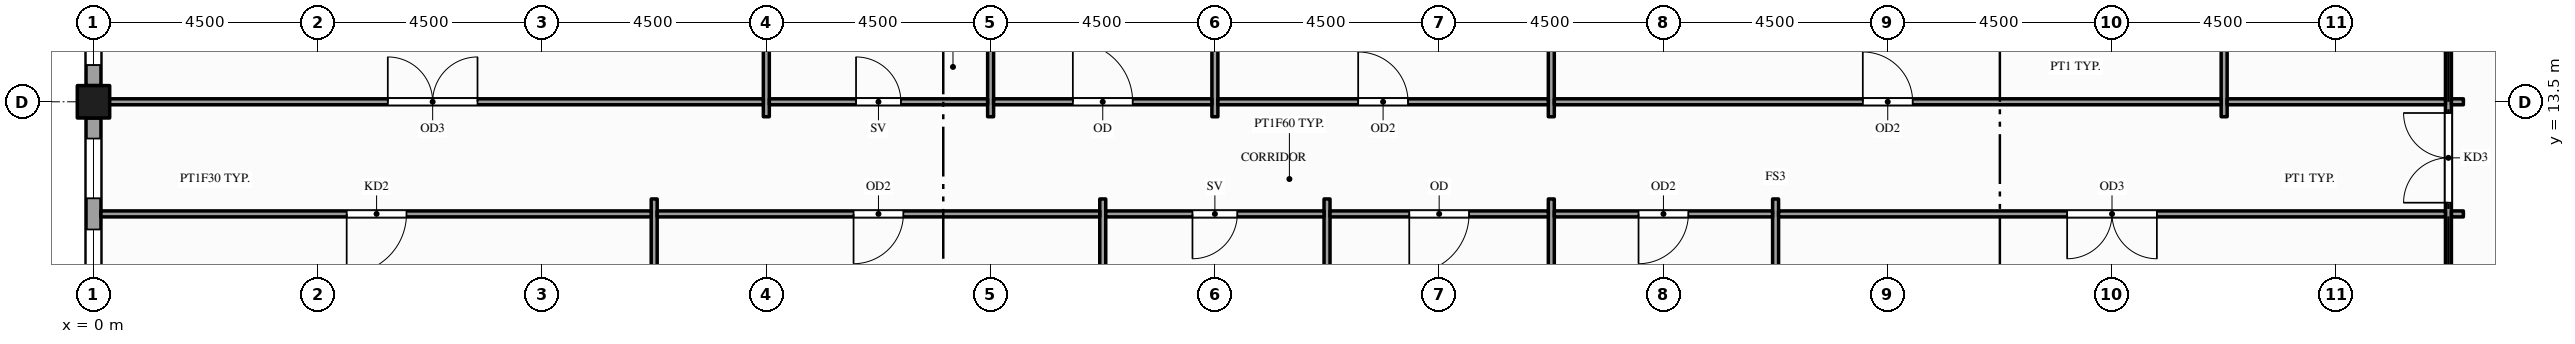
"""IFC4 building model, lengths in metres.
Left out: names, types, materials, properties, quantities, classifications, styles, units other than length and angle.
Written with IfcOpenShell. Run it as: python <this file> out.ifc"""

import sys

from ifc_helpers import new_model, si_unit, direction, frame, frame_2d, origin, origin_2d, place, context, subcontext, project, spatial, rectangle, hollow_rectangle, extrude, element, fill, save


model = new_model("IFC4")
c1 = context("Model", 3, precision=1e-05, world=origin(), true_north=direction((0.0, 1.0)))
c2 = subcontext(c1, "Body", "Model", "MODEL_VIEW")
j1 = project(units=[si_unit("LENGTHUNIT", "METRE"), si_unit("PLANEANGLEUNIT", "RADIAN")], contexts=[c1])
p1 = place(None, origin())
s1 = spatial("IfcSite", under=j1, at=p1, CompositionType="ELEMENT")
p2 = place(p1, origin())
s2 = spatial("IfcBuilding", under=s1, at=p2, CompositionType="ELEMENT")
p3 = place(p2, frame((0.0, 0.0, 261.0)))
s3 = spatial("IfcBuildingStorey", under=s2, at=p3, CompositionType="ELEMENT", Elevation=261.0)
p4 = place(p3, frame((0.0, 13.5, -0.15), z_axis=(0.0, 0.0, 1.0), x_axis=(1.0, 0.0, 0.0)))
e1 = element("IfcColumn", 1, at=p4, inside=s3, PredefinedType="COLUMN", context=c2, shape_type="SweptSolid", body=[
    extrude(hollow_rectangle(XDim=0.65, YDim=0.65, WallThickness=0.032, at=origin_2d()), origin(), (0.0, 0.0, 1.0), 4.0),
])
p5 = place(p3, frame((0.0, 17.675, 0.0), z_axis=(0.0, 0.0, 1.0), x_axis=(0.0, -1.0, 0.0)))
e2 = element("IfcWall", 2, at=p5, inside=s3, PredefinedType="STANDARD", context=c2, shape_type="SweptSolid", body=[
    extrude(rectangle(XDim=3.85, YDim=0.3, at=frame_2d((1.925, 0.0))), origin(), (0.0, 0.0, 1.0), 3.162),
])
p6 = place(p5, frame((0.413, 0.0, 0.9)))
e3 = element("IfcOpeningElement", 3, at=p6, cuts=e2, PredefinedType="OPENING", context=c2, shape_type="SweptSolid", body=[
    extrude(rectangle(XDim=1.2, YDim=2.0, at=frame_2d((0.6, 1.0))), frame((0.0, 0.16, 0.0), z_axis=(0.0, -1.0, 0.0), x_axis=(1.0, 0.0, 0.0)), (0.0, 0.0, 1.0), 0.32),
])
p7 = place(p5, frame((2.238, 0.0, 0.9)))
e4 = element("IfcOpeningElement", 4, at=p7, cuts=e2, PredefinedType="OPENING", context=c2, shape_type="SweptSolid", body=[
    extrude(rectangle(XDim=1.2, YDim=2.0, at=frame_2d((0.6, 1.0))), frame((0.0, 0.16, 0.0), z_axis=(0.0, -1.0, 0.0), x_axis=(1.0, 0.0, 0.0)), (0.0, 0.0, 1.0), 0.32),
])
p8 = place(p3, frame((0.0, 13.175, 0.0), z_axis=(0.0, 0.0, 1.0), x_axis=(0.0, -1.0, 0.0)))
e5 = element("IfcWall", 5, at=p8, inside=s3, PredefinedType="STANDARD", context=c2, shape_type="SweptSolid", body=[
    extrude(rectangle(XDim=3.85, YDim=0.3, at=frame_2d((1.925, 0.0))), origin(), (0.0, 0.0, 1.0), 3.162),
])
p9 = place(p8, frame((0.413, 0.0, 0.9)))
e6 = element("IfcOpeningElement", 6, at=p9, cuts=e5, PredefinedType="OPENING", context=c2, shape_type="SweptSolid", body=[
    extrude(rectangle(XDim=1.2, YDim=2.0, at=frame_2d((0.6, 1.0))), frame((0.0, 0.16, 0.0), z_axis=(0.0, -1.0, 0.0), x_axis=(1.0, 0.0, 0.0)), (0.0, 0.0, 1.0), 0.32),
])
p10 = place(p8, frame((2.238, 0.0, 0.9)))
e7 = element("IfcOpeningElement", 7, at=p10, cuts=e5, PredefinedType="OPENING", context=c2, shape_type="SweptSolid", body=[
    extrude(rectangle(XDim=1.2, YDim=2.0, at=frame_2d((0.6, 1.0))), frame((0.0, 0.16, 0.0), z_axis=(0.0, -1.0, 0.0), x_axis=(1.0, 0.0, 0.0)), (0.0, 0.0, 1.0), 0.32),
])
p11 = place(p3, frame((11.25, 0.15, 0.0), z_axis=(0.0, 0.0, 1.0), x_axis=(0.0, 1.0, 0.0)))
e8 = element("IfcWall", 8, at=p11, inside=s3, PredefinedType="PARTITIONING", context=c2, shape_type="SweptSolid", body=[
    extrude(rectangle(XDim=11.4, YDim=0.12, at=frame_2d((5.7, 0.0))), origin(), (0.0, 0.0, 1.0), 2.87),
])
for number, where, z_axis, x_axis in (
    (9, (13.5, 13.2, 0.0), (0.0, 0.0, 1.0), (0.0, 1.0, 0.0)),
    (10, (18.0, 13.2, 0.0), (0.0, 0.0, 1.0), (0.0, 1.0, 0.0)),
):
    element("IfcWall", number, at=place(p3, frame(where, z_axis=z_axis, x_axis=x_axis)), inside=s3, PredefinedType="PARTITIONING", context=c2, shape_type="SweptSolid", body=[
        extrude(rectangle(XDim=9.15, YDim=0.12, at=frame_2d((4.575, 0.0))), origin(), (0.0, 0.0, 1.0), 2.87),
    ])
p12 = place(p3, frame((20.25, 0.15, 0.0), z_axis=(0.0, 0.0, 1.0), x_axis=(0.0, 1.0, 0.0)))
e11 = element("IfcWall", 11, at=p12, inside=s3, PredefinedType="PARTITIONING", context=c2, shape_type="SweptSolid", body=[
    extrude(rectangle(XDim=11.4, YDim=0.12, at=frame_2d((5.7, 0.0))), origin(), (0.0, 0.0, 1.0), 2.87),
])
p13 = place(p3, frame((22.5, 13.2, 0.0), z_axis=(0.0, 0.0, 1.0), x_axis=(0.0, 1.0, 0.0)))
e12 = element("IfcWall", 12, at=p13, inside=s3, PredefinedType="PARTITIONING", context=c2, shape_type="SweptSolid", body=[
    extrude(rectangle(XDim=9.15, YDim=0.12, at=frame_2d((4.575, 0.0))), origin(), (0.0, 0.0, 1.0), 2.87),
])
for number, where, z_axis, x_axis in (
    (13, (24.75, 1.65, 0.0), (0.0, 0.0, 1.0), (0.0, 1.0, 0.0)),
    (14, (29.25, 1.65, 0.0), (0.0, 0.0, 1.0), (0.0, 1.0, 0.0)),
):
    element("IfcWall", number, at=place(p3, frame(where, z_axis=z_axis, x_axis=x_axis)), inside=s3, PredefinedType="PARTITIONING", context=c2, shape_type="SweptSolid", body=[
        extrude(rectangle(XDim=9.9, YDim=0.12, at=frame_2d((4.95, 0.0))), origin(), (0.0, 0.0, 1.0), 2.87),
    ])
p14 = place(p3, frame((29.25, 13.2, 0.0), z_axis=(0.0, 0.0, 1.0), x_axis=(0.0, 1.0, 0.0)))
e15 = element("IfcWall", 15, at=p14, inside=s3, PredefinedType="PARTITIONING", context=c2, shape_type="SweptSolid", body=[
    extrude(rectangle(XDim=10.65, YDim=0.12, at=frame_2d((5.325, 0.0))), origin(), (0.0, 0.0, 1.0), 2.87),
])
p15 = place(p3, frame((33.75, 1.65, 0.0), z_axis=(0.0, 0.0, 1.0), x_axis=(0.0, 1.0, 0.0)))
e16 = element("IfcWall", 16, at=p15, inside=s3, PredefinedType="PARTITIONING", context=c2, shape_type="SweptSolid", body=[
    extrude(rectangle(XDim=9.9, YDim=0.12, at=frame_2d((4.95, 0.0))), origin(), (0.0, 0.0, 1.0), 2.87),
])
p16 = place(p3, frame((42.75, 13.2, 0.0), z_axis=(0.0, 0.0, 1.0), x_axis=(0.0, 1.0, 0.0)))
e17 = element("IfcWall", 17, at=p16, inside=s3, PredefinedType="PARTITIONING", context=c2, shape_type="SweptSolid", body=[
    extrude(rectangle(XDim=10.65, YDim=0.12, at=frame_2d((5.325, 0.0))), origin(), (0.0, 0.0, 1.0), 2.87),
])
p17 = place(p3, frame((47.25, 1.65, 0.0), z_axis=(0.0, 0.0, 1.0), x_axis=(0.0, 1.0, 0.0)))
e18 = element("IfcWall", 18, at=p17, inside=s3, PredefinedType="PARTITIONING", context=c2, shape_type="SweptSolid", body=[
    extrude(rectangle(XDim=22.2, YDim=0.12, at=frame_2d((11.1, 0.0))), origin(), (0.0, 0.0, 1.0), 2.87),
])
p18 = place(p17, frame((9.825, 0.0, 0.0)))
e19 = element("IfcOpeningElement", 19, at=p18, cuts=e18, PredefinedType="OPENING", context=c2, shape_type="SweptSolid", body=[
    extrude(rectangle(XDim=1.8, YDim=2.1, at=frame_2d((0.9, 1.05))), frame((0.0, 0.07, 0.0), z_axis=(0.0, -1.0, 0.0), x_axis=(1.0, 0.0, 0.0)), (0.0, 0.0, 1.0), 0.14),
])
p19 = place(p17, frame((12.85, 0.0, 0.0)))
e20 = element("IfcOpeningElement", 20, at=p19, cuts=e18, PredefinedType="OPENING", context=c2, shape_type="SweptSolid", body=[
    extrude(rectangle(XDim=0.9, YDim=2.1, at=frame_2d((0.45, 1.05))), frame((0.0, 0.07, 0.0), z_axis=(0.0, -1.0, 0.0), x_axis=(1.0, 0.0, 0.0)), (0.0, 0.0, 1.0), 0.14),
])
p20 = place(p17, frame((16.65, 0.0, 0.0)))
e21 = element("IfcOpeningElement", 21, at=p20, cuts=e18, PredefinedType="OPENING", context=c2, shape_type="SweptSolid", body=[
    extrude(rectangle(XDim=0.9, YDim=2.1, at=frame_2d((0.45, 1.05))), frame((0.0, 0.07, 0.0), z_axis=(0.0, -1.0, 0.0), x_axis=(1.0, 0.0, 0.0)), (0.0, 0.0, 1.0), 0.14),
])
p21 = place(p17, frame((20.35, 0.0, 0.0)))
e22 = element("IfcOpeningElement", 22, at=p21, cuts=e18, PredefinedType="OPENING", context=c2, shape_type="SweptSolid", body=[
    extrude(rectangle(XDim=1.0, YDim=2.1, at=frame_2d((0.5, 1.05))), frame((0.0, 0.07, 0.0), z_axis=(0.0, -1.0, 0.0), x_axis=(1.0, 0.0, 0.0)), (0.0, 0.0, 1.0), 0.14),
])
p22 = place(p3, frame((0.15, 11.25, 0.0), z_axis=(0.0, 0.0, 1.0), x_axis=(1.0, 0.0, 0.0)))
e23 = element("IfcWall", 23, at=p22, inside=s3, PredefinedType="PARTITIONING", context=c2, shape_type="SweptSolid", body=[
    extrude(rectangle(XDim=11.04, YDim=0.12, at=frame_2d((5.52, 0.0))), origin(), (0.0, 0.0, 1.0), 2.87),
])
p23 = place(p22, frame((4.93, 0.0, 0.0)))
e24 = element("IfcOpeningElement", 24, at=p23, cuts=e23, PredefinedType="OPENING", context=c2, shape_type="SweptSolid", body=[
    extrude(rectangle(XDim=1.2, YDim=2.1, at=frame_2d((0.6, 1.05))), frame((0.0, 0.07, 0.0), z_axis=(0.0, -1.0, 0.0), x_axis=(1.0, 0.0, 0.0)), (0.0, 0.0, 1.0), 0.14),
])
p24 = place(p3, frame((11.31, 11.25, 0.0), z_axis=(0.0, 0.0, 1.0), x_axis=(1.0, 0.0, 0.0)))
e25 = element("IfcWall", 25, at=p24, inside=s3, PredefinedType="PARTITIONING", context=c2, shape_type="SweptSolid", body=[
    extrude(rectangle(XDim=8.88, YDim=0.12, at=frame_2d((4.44, 0.0))), origin(), (0.0, 0.0, 1.0), 2.87),
])
p25 = place(p24, frame((3.94, 0.0, 0.0)))
e26 = element("IfcOpeningElement", 26, at=p25, cuts=e25, PredefinedType="OPENING", context=c2, shape_type="SweptSolid", body=[
    extrude(rectangle(XDim=1.0, YDim=2.1, at=frame_2d((0.5, 1.05))), frame((0.0, 0.07, 0.0), z_axis=(0.0, -1.0, 0.0), x_axis=(1.0, 0.0, 0.0)), (0.0, 0.0, 1.0), 0.14),
])
p26 = place(p3, frame((20.31, 11.25, 0.0), z_axis=(0.0, 0.0, 1.0), x_axis=(1.0, 0.0, 0.0)))
e27 = element("IfcWall", 27, at=p26, inside=s3, PredefinedType="PARTITIONING", context=c2, shape_type="SweptSolid", body=[
    extrude(rectangle(XDim=4.38, YDim=0.12, at=frame_2d((2.19, 0.0))), origin(), (0.0, 0.0, 1.0), 2.87),
])
p27 = place(p26, frame((1.74, 0.0, 0.0)))
e28 = element("IfcOpeningElement", 28, at=p27, cuts=e27, PredefinedType="OPENING", context=c2, shape_type="SweptSolid", body=[
    extrude(rectangle(XDim=0.9, YDim=2.1, at=frame_2d((0.45, 1.05))), frame((0.0, 0.07, 0.0), z_axis=(0.0, -1.0, 0.0), x_axis=(1.0, 0.0, 0.0)), (0.0, 0.0, 1.0), 0.14),
])
p28 = place(p3, frame((24.81, 11.25, 0.0), z_axis=(0.0, 0.0, 1.0), x_axis=(1.0, 0.0, 0.0)))
e29 = element("IfcWall", 29, at=p28, inside=s3, PredefinedType="PARTITIONING", context=c2, shape_type="SweptSolid", body=[
    extrude(rectangle(XDim=4.38, YDim=0.12, at=frame_2d((2.19, 0.0))), origin(), (0.0, 0.0, 1.0), 2.87),
])
p29 = place(p28, frame((1.59, 0.0, 0.0)))
e30 = element("IfcOpeningElement", 30, at=p29, cuts=e29, PredefinedType="OPENING", context=c2, shape_type="SweptSolid", body=[
    extrude(rectangle(XDim=1.2, YDim=2.1, at=frame_2d((0.6, 1.05))), frame((0.0, 0.07, 0.0), z_axis=(0.0, -1.0, 0.0), x_axis=(1.0, 0.0, 0.0)), (0.0, 0.0, 1.0), 0.14),
])
p30 = place(p3, frame((29.31, 11.25, 0.0), z_axis=(0.0, 0.0, 1.0), x_axis=(1.0, 0.0, 0.0)))
e31 = element("IfcWall", 31, at=p30, inside=s3, PredefinedType="PARTITIONING", context=c2, shape_type="SweptSolid", body=[
    extrude(rectangle(XDim=4.38, YDim=0.12, at=frame_2d((2.19, 0.0))), origin(), (0.0, 0.0, 1.0), 2.87),
])
p31 = place(p30, frame((1.69, 0.0, 0.0)))
e32 = element("IfcOpeningElement", 32, at=p31, cuts=e31, PredefinedType="OPENING", context=c2, shape_type="SweptSolid", body=[
    extrude(rectangle(XDim=1.0, YDim=2.1, at=frame_2d((0.5, 1.05))), frame((0.0, 0.07, 0.0), z_axis=(0.0, -1.0, 0.0), x_axis=(1.0, 0.0, 0.0)), (0.0, 0.0, 1.0), 0.14),
])
p32 = place(p3, frame((33.81, 11.25, 0.0), z_axis=(0.0, 0.0, 1.0), x_axis=(1.0, 0.0, 0.0)))
e33 = element("IfcWall", 33, at=p32, inside=s3, PredefinedType="PARTITIONING", context=c2, shape_type="SweptSolid", body=[
    extrude(rectangle(XDim=13.38, YDim=0.12, at=frame_2d((6.69, 0.0))), origin(), (0.0, 0.0, 1.0), 2.87),
])
p33 = place(p32, frame((5.79, 0.0, 0.0)))
e34 = element("IfcOpeningElement", 34, at=p33, cuts=e33, PredefinedType="OPENING", context=c2, shape_type="SweptSolid", body=[
    extrude(rectangle(XDim=1.8, YDim=2.1, at=frame_2d((0.9, 1.05))), frame((0.0, 0.07, 0.0), z_axis=(0.0, -1.0, 0.0), x_axis=(1.0, 0.0, 0.0)), (0.0, 0.0, 1.0), 0.14),
])
p34 = place(p3, frame((47.31, 11.25, 0.0), z_axis=(0.0, 0.0, 1.0), x_axis=(1.0, 0.0, 0.0)))
e35 = element("IfcWall", 35, at=p34, inside=s3, PredefinedType="PARTITIONING", context=c2, shape_type="SweptSolid", body=[
    extrude(rectangle(XDim=0.24, YDim=0.12, at=frame_2d((0.12, 0.0))), origin(), (0.0, 0.0, 1.0), 2.87),
])
p35 = place(p3, frame((0.15, 13.5, 0.0), z_axis=(0.0, 0.0, 1.0), x_axis=(1.0, 0.0, 0.0)))
e36 = element("IfcWall", 36, at=p35, inside=s3, PredefinedType="PARTITIONING", context=c2, shape_type="SweptSolid", body=[
    extrude(rectangle(XDim=13.29, YDim=0.12, at=frame_2d((6.645, 0.0))), origin(), (0.0, 0.0, 1.0), 2.87),
])
p36 = place(p35, frame((5.755, 0.0, 0.0)))
e37 = element("IfcOpeningElement", 37, at=p36, cuts=e36, PredefinedType="OPENING", context=c2, shape_type="SweptSolid", body=[
    extrude(rectangle(XDim=1.8, YDim=2.1, at=frame_2d((0.9, 1.05))), frame((0.0, 0.07, 0.0), z_axis=(0.0, -1.0, 0.0), x_axis=(1.0, 0.0, 0.0)), (0.0, 0.0, 1.0), 0.14),
])
p37 = place(p3, frame((13.56, 13.5, 0.0), z_axis=(0.0, 0.0, 1.0), x_axis=(1.0, 0.0, 0.0)))
e38 = element("IfcWall", 38, at=p37, inside=s3, PredefinedType="PARTITIONING", context=c2, shape_type="SweptSolid", body=[
    extrude(rectangle(XDim=4.38, YDim=0.12, at=frame_2d((2.19, 0.0))), origin(), (0.0, 0.0, 1.0), 2.87),
])
p38 = place(p37, frame((1.74, 0.0, 0.0)))
e39 = element("IfcOpeningElement", 39, at=p38, cuts=e38, PredefinedType="OPENING", context=c2, shape_type="SweptSolid", body=[
    extrude(rectangle(XDim=0.9, YDim=2.1, at=frame_2d((0.45, 1.05))), frame((0.0, 0.07, 0.0), z_axis=(0.0, -1.0, 0.0), x_axis=(1.0, 0.0, 0.0)), (0.0, 0.0, 1.0), 0.14),
])
p39 = place(p3, frame((18.06, 13.5, 0.0), z_axis=(0.0, 0.0, 1.0), x_axis=(1.0, 0.0, 0.0)))
e40 = element("IfcWall", 40, at=p39, inside=s3, PredefinedType="PARTITIONING", context=c2, shape_type="SweptSolid", body=[
    extrude(rectangle(XDim=4.38, YDim=0.12, at=frame_2d((2.19, 0.0))), origin(), (0.0, 0.0, 1.0), 2.87),
])
p40 = place(p39, frame((1.59, 0.0, 0.0)))
e41 = element("IfcOpeningElement", 41, at=p40, cuts=e40, PredefinedType="OPENING", context=c2, shape_type="SweptSolid", body=[
    extrude(rectangle(XDim=1.2, YDim=2.1, at=frame_2d((0.6, 1.05))), frame((0.0, 0.07, 0.0), z_axis=(0.0, -1.0, 0.0), x_axis=(1.0, 0.0, 0.0)), (0.0, 0.0, 1.0), 0.14),
])
p41 = place(p3, frame((22.56, 13.5, 0.0), z_axis=(0.0, 0.0, 1.0), x_axis=(1.0, 0.0, 0.0)))
e42 = element("IfcWall", 42, at=p41, inside=s3, PredefinedType="PARTITIONING", context=c2, shape_type="SweptSolid", body=[
    extrude(rectangle(XDim=6.63, YDim=0.12, at=frame_2d((3.315, 0.0))), origin(), (0.0, 0.0, 1.0), 2.87),
])
p42 = place(p41, frame((2.815, 0.0, 0.0)))
e43 = element("IfcOpeningElement", 43, at=p42, cuts=e42, PredefinedType="OPENING", context=c2, shape_type="SweptSolid", body=[
    extrude(rectangle(XDim=1.0, YDim=2.1, at=frame_2d((0.5, 1.05))), frame((0.0, 0.07, 0.0), z_axis=(0.0, -1.0, 0.0), x_axis=(1.0, 0.0, 0.0)), (0.0, 0.0, 1.0), 0.14),
])
p43 = place(p3, frame((29.31, 13.5, 0.0), z_axis=(0.0, 0.0, 1.0), x_axis=(1.0, 0.0, 0.0)))
e44 = element("IfcWall", 44, at=p43, inside=s3, PredefinedType="PARTITIONING", context=c2, shape_type="SweptSolid", body=[
    extrude(rectangle(XDim=13.38, YDim=0.12, at=frame_2d((6.69, 0.0))), origin(), (0.0, 0.0, 1.0), 2.87),
])
p44 = place(p43, frame((6.19, 0.0, 0.0)))
e45 = element("IfcOpeningElement", 45, at=p44, cuts=e44, PredefinedType="OPENING", context=c2, shape_type="SweptSolid", body=[
    extrude(rectangle(XDim=1.0, YDim=2.1, at=frame_2d((0.5, 1.05))), frame((0.0, 0.07, 0.0), z_axis=(0.0, -1.0, 0.0), x_axis=(1.0, 0.0, 0.0)), (0.0, 0.0, 1.0), 0.14),
])
p45 = place(p3, frame((42.81, 13.5, 0.0), z_axis=(0.0, 0.0, 1.0), x_axis=(1.0, 0.0, 0.0)))
e46 = element("IfcWall", 46, at=p45, inside=s3, PredefinedType="PARTITIONING", context=c2, shape_type="SweptSolid", body=[
    extrude(rectangle(XDim=4.38, YDim=0.12, at=frame_2d((2.19, 0.0))), origin(), (0.0, 0.0, 1.0), 2.87),
])
p46 = place(p3, frame((47.31, 13.5, 0.0), z_axis=(0.0, 0.0, 1.0), x_axis=(1.0, 0.0, 0.0)))
e47 = element("IfcWall", 47, at=p46, inside=s3, PredefinedType="PARTITIONING", context=c2, shape_type="SweptSolid", body=[
    extrude(rectangle(XDim=0.24, YDim=0.12, at=frame_2d((0.12, 0.0))), origin(), (0.0, 0.0, 1.0), 2.87),
])
p47 = place(p7, origin())
e48 = element("IfcWindow", 48, at=p47, inside=s3, PartitioningType="SINGLE_PANEL", PredefinedType="WINDOW", context=c2, shape_type="SweptSolid", body=[
    extrude(rectangle(XDim=1.2, YDim=2.0, at=frame_2d((0.6, 1.0))), frame((0.0, 0.03, 0.0), z_axis=(0.0, -1.0, 0.0), x_axis=(1.0, 0.0, 0.0)), (0.0, 0.0, 1.0), 0.06),
])
fill(e4, e48)
p48 = place(p9, origin())
e49 = element("IfcWindow", 49, at=p48, inside=s3, PartitioningType="SINGLE_PANEL", PredefinedType="WINDOW", context=c2, shape_type="SweptSolid", body=[
    extrude(rectangle(XDim=1.2, YDim=2.0, at=frame_2d((0.6, 1.0))), frame((0.0, 0.03, 0.0), z_axis=(0.0, -1.0, 0.0), x_axis=(1.0, 0.0, 0.0)), (0.0, 0.0, 1.0), 0.06),
])
fill(e6, e49)
p49 = place(p10, origin())
e50 = element("IfcWindow", 50, at=p49, inside=s3, PartitioningType="SINGLE_PANEL", PredefinedType="WINDOW", context=c2, shape_type="SweptSolid", body=[
    extrude(rectangle(XDim=1.2, YDim=2.0, at=frame_2d((0.6, 1.0))), frame((0.0, 0.03, 0.0), z_axis=(0.0, -1.0, 0.0), x_axis=(1.0, 0.0, 0.0)), (0.0, 0.0, 1.0), 0.06),
])
fill(e7, e50)
p50 = place(p18, origin())
e51 = element("IfcDoor", 51, at=p50, inside=s3, OperationType="DOUBLE_DOOR_SINGLE_SWING", PredefinedType="DOOR", context=c2, shape_type="SweptSolid", body=[
    extrude(rectangle(XDim=1.8, YDim=2.1, at=frame_2d((0.9, 1.05))), frame((0.0, 0.025, 0.0), z_axis=(0.0, -1.0, 0.0), x_axis=(1.0, 0.0, 0.0)), (0.0, 0.0, 1.0), 0.05),
])
fill(e19, e51)
p51 = place(p23, origin())
e52 = element("IfcDoor", 52, at=p51, inside=s3, OperationType="SINGLE_SWING_LEFT", PredefinedType="DOOR", context=c2, shape_type="SweptSolid", body=[
    extrude(rectangle(XDim=1.2, YDim=2.1, at=frame_2d((0.6, 1.05))), frame((0.0, 0.025, 0.0), z_axis=(0.0, -1.0, 0.0), x_axis=(1.0, 0.0, 0.0)), (0.0, 0.0, 1.0), 0.05),
])
fill(e24, e52)
p52 = place(p25, origin())
e53 = element("IfcDoor", 53, at=p52, inside=s3, OperationType="SINGLE_SWING_LEFT", PredefinedType="DOOR", context=c2, shape_type="SweptSolid", body=[
    extrude(rectangle(XDim=1.0, YDim=2.1, at=frame_2d((0.5, 1.05))), frame((0.0, 0.025, 0.0), z_axis=(0.0, -1.0, 0.0), x_axis=(1.0, 0.0, 0.0)), (0.0, 0.0, 1.0), 0.05),
])
fill(e26, e53)
p53 = place(p27, origin())
e54 = element("IfcDoor", 54, at=p53, inside=s3, OperationType="SINGLE_SWING_LEFT", PredefinedType="DOOR", context=c2, shape_type="SweptSolid", body=[
    extrude(rectangle(XDim=0.9, YDim=2.1, at=frame_2d((0.45, 1.05))), frame((0.0, 0.025, 0.0), z_axis=(0.0, -1.0, 0.0), x_axis=(1.0, 0.0, 0.0)), (0.0, 0.0, 1.0), 0.05),
])
fill(e28, e54)
p54 = place(p29, origin())
e55 = element("IfcDoor", 55, at=p54, inside=s3, OperationType="SINGLE_SWING_LEFT", PredefinedType="DOOR", context=c2, shape_type="SweptSolid", body=[
    extrude(rectangle(XDim=1.2, YDim=2.1, at=frame_2d((0.6, 1.05))), frame((0.0, 0.025, 0.0), z_axis=(0.0, -1.0, 0.0), x_axis=(1.0, 0.0, 0.0)), (0.0, 0.0, 1.0), 0.05),
])
fill(e30, e55)
p55 = place(p31, origin())
e56 = element("IfcDoor", 56, at=p55, inside=s3, OperationType="SINGLE_SWING_LEFT", PredefinedType="DOOR", context=c2, shape_type="SweptSolid", body=[
    extrude(rectangle(XDim=1.0, YDim=2.1, at=frame_2d((0.5, 1.05))), frame((0.0, 0.025, 0.0), z_axis=(0.0, -1.0, 0.0), x_axis=(1.0, 0.0, 0.0)), (0.0, 0.0, 1.0), 0.05),
])
fill(e32, e56)
p56 = place(p33, origin())
e57 = element("IfcDoor", 57, at=p56, inside=s3, OperationType="DOUBLE_DOOR_SINGLE_SWING", PredefinedType="DOOR", context=c2, shape_type="SweptSolid", body=[
    extrude(rectangle(XDim=1.8, YDim=2.1, at=frame_2d((0.9, 1.05))), frame((0.0, 0.025, 0.0), z_axis=(0.0, -1.0, 0.0), x_axis=(1.0, 0.0, 0.0)), (0.0, 0.0, 1.0), 0.05),
])
fill(e34, e57)
p57 = place(p36, origin())
e58 = element("IfcDoor", 58, at=p57, inside=s3, OperationType="DOUBLE_DOOR_SINGLE_SWING", PredefinedType="DOOR", context=c2, shape_type="SweptSolid", body=[
    extrude(rectangle(XDim=1.8, YDim=2.1, at=frame_2d((0.9, 1.05))), frame((0.0, 0.025, 0.0), z_axis=(0.0, -1.0, 0.0), x_axis=(1.0, 0.0, 0.0)), (0.0, 0.0, 1.0), 0.05),
])
fill(e37, e58)
p58 = place(p38, origin())
e59 = element("IfcDoor", 59, at=p58, inside=s3, OperationType="SINGLE_SWING_LEFT", PredefinedType="DOOR", context=c2, shape_type="SweptSolid", body=[
    extrude(rectangle(XDim=0.9, YDim=2.1, at=frame_2d((0.45, 1.05))), frame((0.0, 0.025, 0.0), z_axis=(0.0, -1.0, 0.0), x_axis=(1.0, 0.0, 0.0)), (0.0, 0.0, 1.0), 0.05),
])
fill(e39, e59)
p59 = place(p40, origin())
e60 = element("IfcDoor", 60, at=p59, inside=s3, OperationType="SINGLE_SWING_LEFT", PredefinedType="DOOR", context=c2, shape_type="SweptSolid", body=[
    extrude(rectangle(XDim=1.2, YDim=2.1, at=frame_2d((0.6, 1.05))), frame((0.0, 0.025, 0.0), z_axis=(0.0, -1.0, 0.0), x_axis=(1.0, 0.0, 0.0)), (0.0, 0.0, 1.0), 0.05),
])
fill(e41, e60)
p60 = place(p42, origin())
e61 = element("IfcDoor", 61, at=p60, inside=s3, OperationType="SINGLE_SWING_LEFT", PredefinedType="DOOR", context=c2, shape_type="SweptSolid", body=[
    extrude(rectangle(XDim=1.0, YDim=2.1, at=frame_2d((0.5, 1.05))), frame((0.0, 0.025, 0.0), z_axis=(0.0, -1.0, 0.0), x_axis=(1.0, 0.0, 0.0)), (0.0, 0.0, 1.0), 0.05),
])
fill(e43, e61)
p61 = place(p44, origin())
e62 = element("IfcDoor", 62, at=p61, inside=s3, OperationType="SINGLE_SWING_LEFT", PredefinedType="DOOR", context=c2, shape_type="SweptSolid", body=[
    extrude(rectangle(XDim=1.0, YDim=2.1, at=frame_2d((0.5, 1.05))), frame((0.0, 0.025, 0.0), z_axis=(0.0, -1.0, 0.0), x_axis=(1.0, 0.0, 0.0)), (0.0, 0.0, 1.0), 0.05),
])
fill(e45, e62)
save(model, sys.argv[1])
